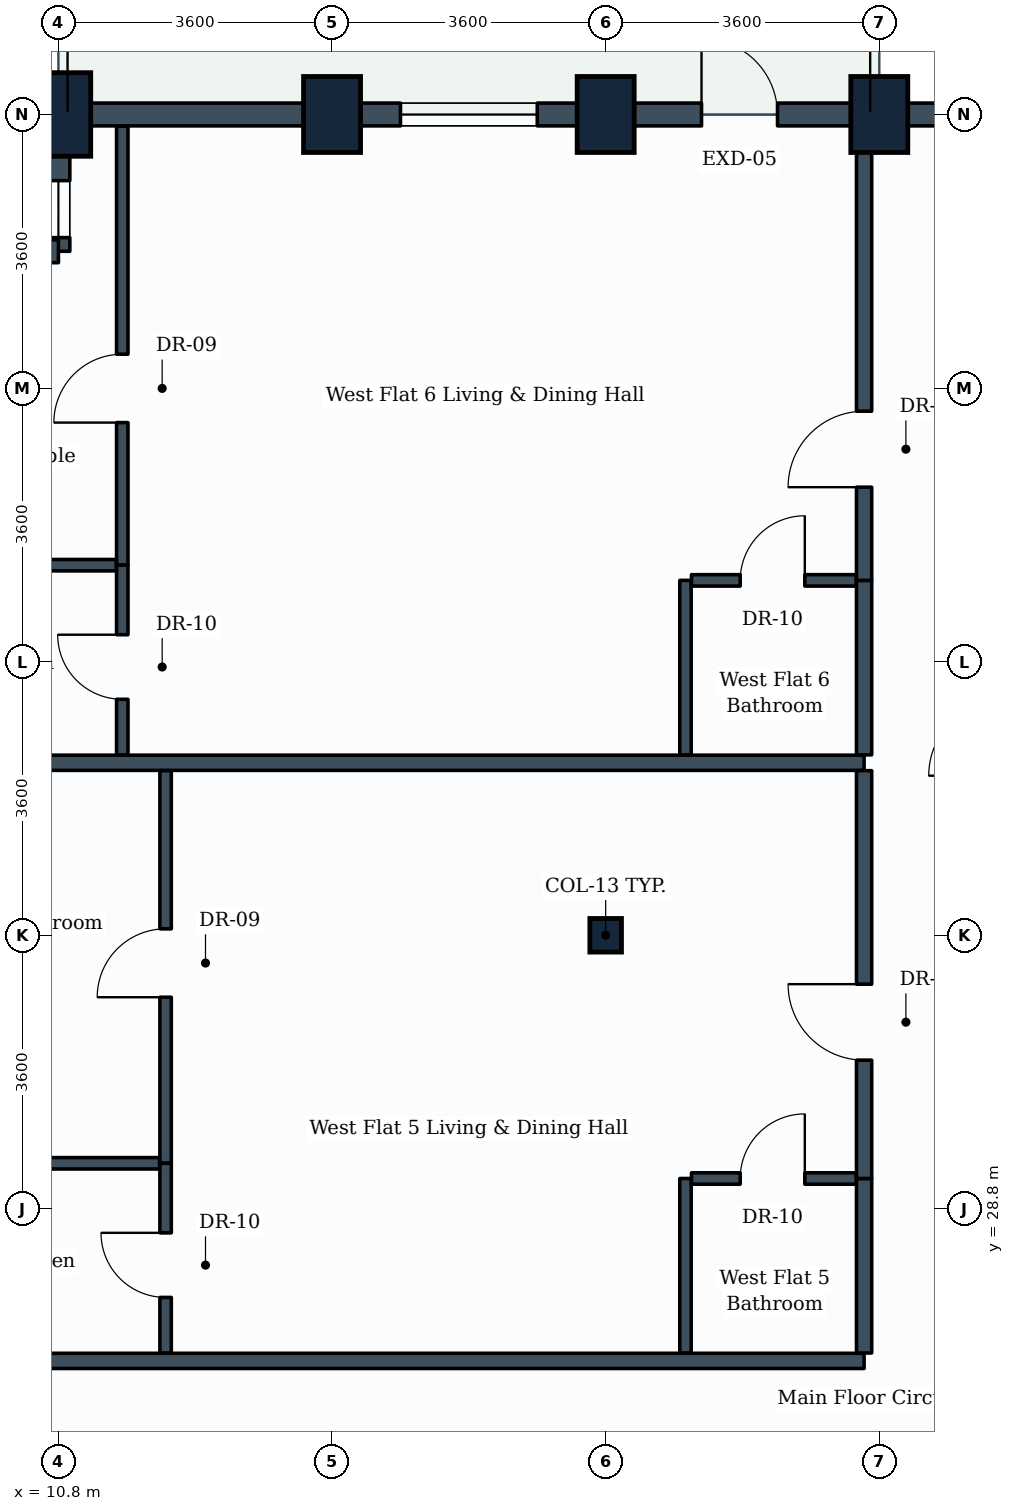
"""IFC4 building model, lengths in metres.
Left out: names, types, materials, properties, quantities, classifications, styles, units other than length and angle.
Written with IfcOpenShell. Run it as: python <this file> out.ifc"""

import sys

from ifc_helpers import new_model, si_unit, direction, frame, frame_2d, origin, origin_2d, place, context, subcontext, project, spatial, rectangle, i_section, extrude, element, fill, save


model = new_model("IFC4")
c1 = context("Model", 3, precision=1e-05, world=origin(), true_north=direction((0.0, 1.0)))
c2 = subcontext(c1, "Body", "Model", "MODEL_VIEW")
j1 = project(units=[si_unit("LENGTHUNIT", "METRE"), si_unit("PLANEANGLEUNIT", "RADIAN")], contexts=[c1])
p1 = place(None, origin())
s1 = spatial("IfcSite", under=j1, at=p1, CompositionType="ELEMENT")
p2 = place(p1, origin())
s2 = spatial("IfcBuilding", under=s1, at=p2, CompositionType="ELEMENT")
p3 = place(p2, frame((0.0, 0.0, 135.2)))
s3 = spatial("IfcBuildingStorey", under=s2, at=p3, CompositionType="ELEMENT", Elevation=135.2)
p4 = place(p3, frame((10.8, 43.2, 0.0), z_axis=(0.0, 0.0, 1.0), x_axis=(1.0, 0.0, 0.0)))
e1 = element("IfcColumn", 1, at=p4, inside=s3, PredefinedType="COLUMN", context=c2, shape_type="SweptSolid", body=[
    extrude(rectangle(XDim=0.85, YDim=1.1, at=origin_2d()), origin(), (0.0, 0.0, 1.0), 3.8),
])
p5 = place(p3, frame((14.4, 43.2, 0.0), z_axis=(0.0, 0.0, 1.0), x_axis=(1.0, 0.0, 0.0)))
e2 = element("IfcColumn", 2, at=p5, inside=s3, PredefinedType="COLUMN", context=c2, shape_type="SweptSolid", body=[
    extrude(rectangle(XDim=0.75, YDim=1.0, at=origin_2d()), origin(), (0.0, 0.0, 1.0), 3.8),
])
p6 = place(p3, frame((18.0, 32.4, 0.0), z_axis=(0.0, 0.0, 1.0), x_axis=(1.0, 0.0, 0.0)))
e3 = element("IfcColumn", 3, at=p6, inside=s3, PredefinedType="COLUMN", context=c2, shape_type="SweptSolid", body=[
    extrude(i_section(OverallWidth=0.416, OverallDepth=0.442, WebThickness=0.025, FlangeThickness=0.041, FilletRadius=0.015, at=origin_2d()), origin(), (0.0, 0.0, 1.0), 3.8),
])
for number, where, z_axis, x_axis in (
    (4, (18.0, 43.2, 0.0), (0.0, 0.0, 1.0), (1.0, 0.0, 0.0)),
    (5, (21.6, 43.2, 0.0), (0.0, 0.0, 1.0), (1.0, 0.0, 0.0)),
):
    element("IfcColumn", number, at=place(p3, frame(where, z_axis=z_axis, x_axis=x_axis)), inside=s3, PredefinedType="COLUMN", context=c2, shape_type="SweptSolid", body=[
        extrude(rectangle(XDim=0.75, YDim=1.0, at=origin_2d()), origin(), (0.0, 0.0, 1.0), 3.8),
    ])
p7 = place(p3, frame((21.6, 43.2, 0.0), z_axis=(0.0, 0.0, 1.0), x_axis=(1.0, 0.0, 0.0)))
e6 = element("IfcWall", 6, at=p7, inside=s3, PredefinedType="STANDARD", context=c2, shape_type="SweptSolid", body=[
    extrude(rectangle(XDim=3.6, YDim=0.3, at=frame_2d((1.8, 0.0))), origin(), (0.0, 0.0, 1.0), 2.93),
])
p8 = place(p3, frame((18.0, 43.2, 0.0), z_axis=(0.0, 0.0, 1.0), x_axis=(1.0, 0.0, 0.0)))
e7 = element("IfcWall", 7, at=p8, inside=s3, PredefinedType="STANDARD", context=c2, shape_type="SweptSolid", body=[
    extrude(rectangle(XDim=3.6, YDim=0.3, at=frame_2d((1.8, 0.0))), origin(), (0.0, 0.0, 1.0), 2.93),
])
p9 = place(p8, frame((1.261, 0.0, 0.0)))
e8 = element("IfcOpeningElement", 8, at=p9, cuts=e7, PredefinedType="OPENING", context=c2, shape_type="SweptSolid", body=[
    extrude(rectangle(XDim=1.0, YDim=2.1, at=frame_2d((0.5, 1.05))), frame((0.0, 0.16, 0.0), z_axis=(0.0, -1.0, 0.0), x_axis=(1.0, 0.0, 0.0)), (0.0, 0.0, 1.0), 0.32),
])
p10 = place(p3, frame((14.4, 43.2, 0.0), z_axis=(0.0, 0.0, 1.0), x_axis=(1.0, 0.0, 0.0)))
e9 = element("IfcWall", 9, at=p10, inside=s3, PredefinedType="STANDARD", context=c2, shape_type="SweptSolid", body=[
    extrude(rectangle(XDim=3.6, YDim=0.3, at=frame_2d((1.8, 0.0))), origin(), (0.0, 0.0, 1.0), 2.93),
])
p11 = place(p10, frame((0.9, 0.0, 0.85)))
e10 = element("IfcOpeningElement", 10, at=p11, cuts=e9, PredefinedType="OPENING", context=c2, shape_type="SweptSolid", body=[
    extrude(rectangle(XDim=1.8, YDim=1.35, at=frame_2d((0.9, 0.675))), frame((0.0, 0.16, 0.0), z_axis=(0.0, -1.0, 0.0), x_axis=(1.0, 0.0, 0.0)), (0.0, 0.0, 1.0), 0.32),
])
p12 = place(p3, frame((10.8, 43.2, 0.0), z_axis=(0.0, 0.0, 1.0), x_axis=(1.0, 0.0, 0.0)))
e11 = element("IfcWall", 11, at=p12, inside=s3, PredefinedType="STANDARD", context=c2, shape_type="SweptSolid", body=[
    extrude(rectangle(XDim=3.6, YDim=0.3, at=frame_2d((1.8, 0.0))), origin(), (0.0, 0.0, 1.0), 2.93),
])
p13 = place(p3, frame((10.8, 41.4, 0.0), z_axis=(0.0, 0.0, 1.0), x_axis=(0.0, 1.0, 0.0)))
e12 = element("IfcWall", 12, at=p13, inside=s3, PredefinedType="STANDARD", context=c2, shape_type="SweptSolid", body=[
    extrude(rectangle(XDim=1.8, YDim=0.3, at=frame_2d((0.9, 0.0))), origin(), (0.0, 0.0, 1.0), 2.93),
])
p14 = place(p13, frame((0.18, 0.0, 0.85)))
e13 = element("IfcOpeningElement", 13, at=p14, cuts=e12, PredefinedType="OPENING", context=c2, shape_type="SweptSolid", body=[
    extrude(rectangle(XDim=0.75, YDim=1.05, at=frame_2d((0.375, 0.525))), frame((0.0, 0.16, 0.0), z_axis=(0.0, -1.0, 0.0), x_axis=(1.0, 0.0, 0.0)), (0.0, 0.0, 1.0), 0.32),
])
p15 = place(p3, frame((9.0, 41.4, 0.0), z_axis=(0.0, 0.0, 1.0), x_axis=(1.0, 0.0, 0.0)))
e14 = element("IfcWall", 14, at=p15, inside=s3, PredefinedType="STANDARD", context=c2, shape_type="SweptSolid", body=[
    extrude(rectangle(XDim=1.8, YDim=0.3, at=frame_2d((0.9, 0.0))), origin(), (0.0, 0.0, 1.0), 3.535),
])
for number, where, z_axis, x_axis in (
    (15, (7.354, 26.8, 0.0), (0.0, 0.0, 1.0), (1.0, 0.0, 0.0)),
    (16, (7.354, 34.67, 0.0), (0.0, 0.0, 1.0), (1.0, 0.0, 0.0)),
):
    element("IfcWall", number, at=place(p3, frame(where, z_axis=z_axis, x_axis=x_axis)), inside=s3, PredefinedType="PARTITIONING", context=c2, shape_type="SweptSolid", body=[
        extrude(rectangle(XDim=14.046, YDim=0.2, at=frame_2d((7.023, 0.0))), origin(), (0.0, 0.0, 1.0), 2.93),
    ])
p16 = place(p3, frame((21.4, 26.904, 0.0), z_axis=(0.0, 0.0, 1.0), x_axis=(0.0, 1.0, 0.0)))
e17 = element("IfcWall", 17, at=p16, inside=s3, PredefinedType="PARTITIONING", context=c2, shape_type="SweptSolid", body=[
    extrude(rectangle(XDim=2.296, YDim=0.2, at=frame_2d((1.148, 0.0))), origin(), (0.0, 0.0, 1.0), 3.13),
])
p17 = place(p3, frame((19.05, 26.904, 0.0), z_axis=(0.0, 0.0, 1.0), x_axis=(0.0, 1.0, 0.0)))
e18 = element("IfcWall", 18, at=p17, inside=s3, PredefinedType="PARTITIONING", context=c2, shape_type="SweptSolid", body=[
    extrude(rectangle(XDim=2.296, YDim=0.15, at=frame_2d((1.148, 0.0))), origin(), (0.0, 0.0, 1.0), 3.17),
])
p18 = place(p3, frame((19.129, 29.2, 0.0), z_axis=(0.0, 0.0, 1.0), x_axis=(1.0, 0.0, 0.0)))
e19 = element("IfcWall", 19, at=p18, inside=s3, PredefinedType="PARTITIONING", context=c2, shape_type="SweptSolid", body=[
    extrude(rectangle(XDim=2.167, YDim=0.15, at=frame_2d((1.083, 0.0))), origin(), (0.0, 0.0, 1.0), 3.535),
])
p19 = place(p18, frame((0.641, 0.0, 0.0)))
e20 = element("IfcOpeningElement", 20, at=p19, cuts=e19, PredefinedType="OPENING", context=c2, shape_type="SweptSolid", body=[
    extrude(rectangle(XDim=0.85, YDim=2.1, at=frame_2d((0.425, 1.05))), frame((0.0, 0.085, 0.0), z_axis=(0.0, -1.0, 0.0), x_axis=(1.0, 0.0, 0.0)), (0.0, 0.0, 1.0), 0.17),
])
p20 = place(p3, frame((21.4, 29.2, 0.0), z_axis=(0.0, 0.0, 1.0), x_axis=(0.0, 1.0, 0.0)))
e21 = element("IfcWall", 21, at=p20, inside=s3, PredefinedType="PARTITIONING", context=c2, shape_type="SweptSolid", body=[
    extrude(rectangle(XDim=5.366, YDim=0.2, at=frame_2d((2.683, 0.0))), origin(), (0.0, 0.0, 1.0), 3.13),
])
p21 = place(p20, frame((1.557, 0.0, 0.0)))
e22 = element("IfcOpeningElement", 22, at=p21, cuts=e21, PredefinedType="OPENING", context=c2, shape_type="SweptSolid", body=[
    extrude(rectangle(XDim=1.0, YDim=2.1, at=frame_2d((0.5, 1.05))), frame((0.0, 0.11, 0.0), z_axis=(0.0, -1.0, 0.0), x_axis=(1.0, 0.0, 0.0)), (0.0, 0.0, 1.0), 0.22),
])
p22 = place(p3, frame((12.21, 29.4, 0.0), z_axis=(0.0, 0.0, 1.0), x_axis=(0.0, 1.0, 0.0)))
e23 = element("IfcWall", 23, at=p22, inside=s3, PredefinedType="PARTITIONING", context=c2, shape_type="SweptSolid", body=[
    extrude(rectangle(XDim=5.166, YDim=0.15, at=frame_2d((2.583, 0.0))), origin(), (0.0, 0.0, 1.0), 3.18),
])
p23 = place(p22, frame((2.185, 0.0, 0.0)))
e24 = element("IfcOpeningElement", 24, at=p23, cuts=e23, PredefinedType="OPENING", context=c2, shape_type="SweptSolid", body=[
    extrude(rectangle(XDim=0.9, YDim=2.1, at=frame_2d((0.45, 1.05))), frame((0.0, 0.085, 0.0), z_axis=(0.0, -1.0, 0.0), x_axis=(1.0, 0.0, 0.0)), (0.0, 0.0, 1.0), 0.17),
])
p24 = place(p3, frame((12.21, 26.904, 0.0), z_axis=(0.0, 0.0, 1.0), x_axis=(0.0, 1.0, 0.0)))
e25 = element("IfcWall", 25, at=p24, inside=s3, PredefinedType="PARTITIONING", context=c2, shape_type="SweptSolid", body=[
    extrude(rectangle(XDim=2.496, YDim=0.15, at=frame_2d((1.248, 0.0))), origin(), (0.0, 0.0, 1.0), 3.17),
])
p25 = place(p24, frame((0.731, 0.0, 0.0)))
e26 = element("IfcOpeningElement", 26, at=p25, cuts=e25, PredefinedType="OPENING", context=c2, shape_type="SweptSolid", body=[
    extrude(rectangle(XDim=0.85, YDim=2.1, at=frame_2d((0.425, 1.05))), frame((0.0, 0.085, 0.0), z_axis=(0.0, -1.0, 0.0), x_axis=(1.0, 0.0, 0.0)), (0.0, 0.0, 1.0), 0.17),
])
p26 = place(p3, frame((7.354, 29.4, 0.0), z_axis=(0.0, 0.0, 1.0), x_axis=(1.0, 0.0, 0.0)))
e27 = element("IfcWall", 27, at=p26, inside=s3, PredefinedType="PARTITIONING", context=c2, shape_type="SweptSolid", body=[
    extrude(rectangle(XDim=4.777, YDim=0.15, at=frame_2d((2.389, 0.0))), origin(), (0.0, 0.0, 1.0), 2.93),
])
p27 = place(p3, frame((21.4, 34.774, 0.0), z_axis=(0.0, 0.0, 1.0), x_axis=(0.0, 1.0, 0.0)))
e28 = element("IfcWall", 28, at=p27, inside=s3, PredefinedType="PARTITIONING", context=c2, shape_type="SweptSolid", body=[
    extrude(rectangle(XDim=2.296, YDim=0.2, at=frame_2d((1.148, 0.0))), origin(), (0.0, 0.0, 1.0), 3.17),
])
p28 = place(p3, frame((19.05, 34.774, 0.0), z_axis=(0.0, 0.0, 1.0), x_axis=(0.0, 1.0, 0.0)))
e29 = element("IfcWall", 29, at=p28, inside=s3, PredefinedType="PARTITIONING", context=c2, shape_type="SweptSolid", body=[
    extrude(rectangle(XDim=2.296, YDim=0.15, at=frame_2d((1.148, 0.0))), origin(), (0.0, 0.0, 1.0), 3.17),
])
p29 = place(p3, frame((19.129, 37.07, 0.0), z_axis=(0.0, 0.0, 1.0), x_axis=(1.0, 0.0, 0.0)))
e30 = element("IfcWall", 30, at=p29, inside=s3, PredefinedType="PARTITIONING", context=c2, shape_type="SweptSolid", body=[
    extrude(rectangle(XDim=2.167, YDim=0.15, at=frame_2d((1.083, 0.0))), origin(), (0.0, 0.0, 1.0), 3.535),
])
p30 = place(p29, frame((0.641, 0.0, 0.0)))
e31 = element("IfcOpeningElement", 31, at=p30, cuts=e30, PredefinedType="OPENING", context=c2, shape_type="SweptSolid", body=[
    extrude(rectangle(XDim=0.85, YDim=2.1, at=frame_2d((0.425, 1.05))), frame((0.0, 0.085, 0.0), z_axis=(0.0, -1.0, 0.0), x_axis=(1.0, 0.0, 0.0)), (0.0, 0.0, 1.0), 0.17),
])
p31 = place(p3, frame((21.4, 37.07, 0.0), z_axis=(0.0, 0.0, 1.0), x_axis=(0.0, 1.0, 0.0)))
e32 = element("IfcWall", 32, at=p31, inside=s3, PredefinedType="PARTITIONING", context=c2, shape_type="SweptSolid", body=[
    extrude(rectangle(XDim=5.976, YDim=0.2, at=frame_2d((2.988, 0.0))), origin(), (0.0, 0.0, 1.0), 2.93),
])
p32 = place(p31, frame((1.226, 0.0, 0.0)))
e33 = element("IfcOpeningElement", 33, at=p32, cuts=e32, PredefinedType="OPENING", context=c2, shape_type="SweptSolid", body=[
    extrude(rectangle(XDim=1.0, YDim=2.1, at=frame_2d((0.5, 1.05))), frame((0.0, 0.11, 0.0), z_axis=(0.0, -1.0, 0.0), x_axis=(1.0, 0.0, 0.0)), (0.0, 0.0, 1.0), 0.22),
])
p33 = place(p3, frame((11.64, 37.27, 0.0), z_axis=(0.0, 0.0, 1.0), x_axis=(0.0, 1.0, 0.0)))
e34 = element("IfcWall", 34, at=p33, inside=s3, PredefinedType="PARTITIONING", context=c2, shape_type="SweptSolid", body=[
    extrude(rectangle(XDim=5.776, YDim=0.15, at=frame_2d((2.888, 0.0))), origin(), (0.0, 0.0, 1.0), 2.93),
])
p34 = place(p33, frame((1.876, 0.0, 0.0)))
e35 = element("IfcOpeningElement", 35, at=p34, cuts=e34, PredefinedType="OPENING", context=c2, shape_type="SweptSolid", body=[
    extrude(rectangle(XDim=0.9, YDim=2.1, at=frame_2d((0.45, 1.05))), frame((0.0, 0.085, 0.0), z_axis=(0.0, -1.0, 0.0), x_axis=(1.0, 0.0, 0.0)), (0.0, 0.0, 1.0), 0.17),
])
p35 = place(p3, frame((11.64, 34.774, 0.0), z_axis=(0.0, 0.0, 1.0), x_axis=(0.0, 1.0, 0.0)))
e36 = element("IfcWall", 36, at=p35, inside=s3, PredefinedType="PARTITIONING", context=c2, shape_type="SweptSolid", body=[
    extrude(rectangle(XDim=2.496, YDim=0.15, at=frame_2d((1.248, 0.0))), origin(), (0.0, 0.0, 1.0), 3.17),
])
p36 = place(p35, frame((0.731, 0.0, 0.0)))
e37 = element("IfcOpeningElement", 37, at=p36, cuts=e36, PredefinedType="OPENING", context=c2, shape_type="SweptSolid", body=[
    extrude(rectangle(XDim=0.85, YDim=2.1, at=frame_2d((0.425, 1.05))), frame((0.0, 0.085, 0.0), z_axis=(0.0, -1.0, 0.0), x_axis=(1.0, 0.0, 0.0)), (0.0, 0.0, 1.0), 0.17),
])
p37 = place(p3, frame((7.354, 37.27, 0.0), z_axis=(0.0, 0.0, 1.0), x_axis=(1.0, 0.0, 0.0)))
e38 = element("IfcWall", 38, at=p37, inside=s3, PredefinedType="PARTITIONING", context=c2, shape_type="SweptSolid", body=[
    extrude(rectangle(XDim=4.207, YDim=0.15, at=frame_2d((2.104, 0.0))), origin(), (0.0, 0.0, 1.0), 2.93),
])
p38 = place(p9, origin())
e39 = element("IfcDoor", 39, at=p38, inside=s3, OperationType="SINGLE_SWING_LEFT", PredefinedType="DOOR", context=c2, shape_type="SweptSolid", body=[
    extrude(rectangle(XDim=1.0, YDim=2.1, at=frame_2d((0.5, 1.05))), frame((0.0, 0.025, 0.0), z_axis=(0.0, -1.0, 0.0), x_axis=(1.0, 0.0, 0.0)), (0.0, 0.0, 1.0), 0.05),
])
fill(e8, e39)
p39 = place(p11, origin())
e40 = element("IfcWindow", 40, at=p39, inside=s3, PartitioningType="SINGLE_PANEL", PredefinedType="WINDOW", context=c2, shape_type="SweptSolid", body=[
    extrude(rectangle(XDim=1.8, YDim=1.35, at=frame_2d((0.9, 0.675))), frame((0.0, 0.03, 0.0), z_axis=(0.0, -1.0, 0.0), x_axis=(1.0, 0.0, 0.0)), (0.0, 0.0, 1.0), 0.06),
])
fill(e10, e40)
p40 = place(p19, origin())
e41 = element("IfcDoor", 41, at=p40, inside=s3, OperationType="SINGLE_SWING_RIGHT", PredefinedType="DOOR", context=c2, shape_type="SweptSolid", body=[
    extrude(rectangle(XDim=0.85, YDim=2.1, at=frame_2d((0.425, 1.05))), frame((0.0, 0.025, 0.0), z_axis=(0.0, -1.0, 0.0), x_axis=(1.0, 0.0, 0.0)), (0.0, 0.0, 1.0), 0.05),
])
fill(e20, e41)
p41 = place(p21, origin())
e42 = element("IfcDoor", 42, at=p41, inside=s3, OperationType="SINGLE_SWING_RIGHT", PredefinedType="DOOR", context=c2, shape_type="SweptSolid", body=[
    extrude(rectangle(XDim=1.0, YDim=2.1, at=frame_2d((0.5, 1.05))), frame((0.0, 0.025, 0.0), z_axis=(0.0, -1.0, 0.0), x_axis=(1.0, 0.0, 0.0)), (0.0, 0.0, 1.0), 0.05),
])
fill(e22, e42)
p42 = place(p23, origin())
e43 = element("IfcDoor", 43, at=p42, inside=s3, OperationType="SINGLE_SWING_LEFT", PredefinedType="DOOR", context=c2, shape_type="SweptSolid", body=[
    extrude(rectangle(XDim=0.9, YDim=2.1, at=frame_2d((0.45, 1.05))), frame((0.0, 0.025, 0.0), z_axis=(0.0, -1.0, 0.0), x_axis=(1.0, 0.0, 0.0)), (0.0, 0.0, 1.0), 0.05),
])
fill(e24, e43)
p43 = place(p25, origin())
e44 = element("IfcDoor", 44, at=p43, inside=s3, OperationType="SINGLE_SWING_RIGHT", PredefinedType="DOOR", context=c2, shape_type="SweptSolid", body=[
    extrude(rectangle(XDim=0.85, YDim=2.1, at=frame_2d((0.425, 1.05))), frame((0.0, 0.025, 0.0), z_axis=(0.0, -1.0, 0.0), x_axis=(1.0, 0.0, 0.0)), (0.0, 0.0, 1.0), 0.05),
])
fill(e26, e44)
p44 = place(p30, origin())
e45 = element("IfcDoor", 45, at=p44, inside=s3, OperationType="SINGLE_SWING_RIGHT", PredefinedType="DOOR", context=c2, shape_type="SweptSolid", body=[
    extrude(rectangle(XDim=0.85, YDim=2.1, at=frame_2d((0.425, 1.05))), frame((0.0, 0.025, 0.0), z_axis=(0.0, -1.0, 0.0), x_axis=(1.0, 0.0, 0.0)), (0.0, 0.0, 1.0), 0.05),
])
fill(e31, e45)
p45 = place(p32, origin())
e46 = element("IfcDoor", 46, at=p45, inside=s3, OperationType="SINGLE_SWING_LEFT", PredefinedType="DOOR", context=c2, shape_type="SweptSolid", body=[
    extrude(rectangle(XDim=1.0, YDim=2.1, at=frame_2d((0.5, 1.05))), frame((0.0, 0.025, 0.0), z_axis=(0.0, -1.0, 0.0), x_axis=(1.0, 0.0, 0.0)), (0.0, 0.0, 1.0), 0.05),
])
fill(e33, e46)
p46 = place(p34, origin())
e47 = element("IfcDoor", 47, at=p46, inside=s3, OperationType="SINGLE_SWING_LEFT", PredefinedType="DOOR", context=c2, shape_type="SweptSolid", body=[
    extrude(rectangle(XDim=0.9, YDim=2.1, at=frame_2d((0.45, 1.05))), frame((0.0, 0.025, 0.0), z_axis=(0.0, -1.0, 0.0), x_axis=(1.0, 0.0, 0.0)), (0.0, 0.0, 1.0), 0.05),
])
fill(e35, e47)
p47 = place(p36, origin())
e48 = element("IfcDoor", 48, at=p47, inside=s3, OperationType="SINGLE_SWING_RIGHT", PredefinedType="DOOR", context=c2, shape_type="SweptSolid", body=[
    extrude(rectangle(XDim=0.85, YDim=2.1, at=frame_2d((0.425, 1.05))), frame((0.0, 0.025, 0.0), z_axis=(0.0, -1.0, 0.0), x_axis=(1.0, 0.0, 0.0)), (0.0, 0.0, 1.0), 0.05),
])
fill(e37, e48)
p48 = place(p14, origin())
e49 = element("IfcWindow", 49, at=p48, inside=s3, PartitioningType="SINGLE_PANEL", PredefinedType="WINDOW", context=c2, shape_type="SweptSolid", body=[
    extrude(rectangle(XDim=0.75, YDim=1.05, at=frame_2d((0.375, 0.525))), frame((0.0, 0.03, 0.0), z_axis=(0.0, -1.0, 0.0), x_axis=(1.0, 0.0, 0.0)), (0.0, 0.0, 1.0), 0.06),
])
fill(e13, e49)
save(model, sys.argv[1])
